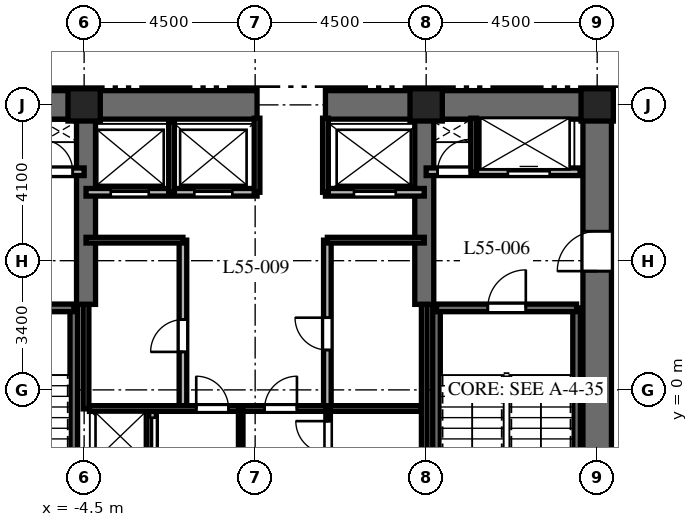
"""IFC4 building model, lengths in metres.
Left out: names, types, materials, properties, quantities, classifications, styles, units other than length and angle.
Written with IfcOpenShell. Run it as: python <this file> out.ifc"""

import sys

from ifc_helpers import new_model, si_unit, direction, frame, frame_2d, origin, origin_2d, place, context, subcontext, project, spatial, rectangle, extrude, element, fill, save


model = new_model("IFC4")
c1 = context("Model", 3, precision=1e-05, world=origin(), true_north=direction((0.0, 1.0)))
c2 = subcontext(c1, "Body", "Model", "MODEL_VIEW")
j1 = project(units=[si_unit("LENGTHUNIT", "METRE"), si_unit("PLANEANGLEUNIT", "RADIAN")], contexts=[c1])
p1 = place(None, origin())
s1 = spatial("IfcSite", under=j1, at=p1, CompositionType="ELEMENT")
p2 = place(p1, origin())
s2 = spatial("IfcBuilding", under=s1, at=p2, CompositionType="ELEMENT")
p3 = place(p2, frame((0.0, 0.0, 221.7)))
s3 = spatial("IfcBuildingStorey", under=s2, at=p3, CompositionType="ELEMENT", Elevation=221.7)
p4 = place(p3, frame((-9.375, 7.5, 0.0), z_axis=(0.0, 0.0, 1.0), x_axis=(1.0, 0.0, 0.0)))
e1 = element("IfcWall", 1, at=p4, inside=s3, PredefinedType="SHEAR", context=c2, shape_type="SweptSolid", body=[
    extrude(rectangle(XDim=9.425, YDim=0.75, at=frame_2d((4.712, 0.0))), origin(), (0.0, 0.0, 1.0), 3.8),
])
p5 = place(p3, frame((1.85, 7.5, 0.0), z_axis=(0.0, 0.0, 1.0), x_axis=(1.0, 0.0, 0.0)))
e2 = element("IfcWall", 2, at=p5, inside=s3, PredefinedType="SHEAR", context=c2, shape_type="SweptSolid", body=[
    extrude(rectangle(XDim=7.525, YDim=0.75, at=frame_2d((3.762, 0.0))), origin(), (0.0, 0.0, 1.0), 3.8),
])
p6 = place(p3, frame((9.0, -7.125, 0.0), z_axis=(0.0, 0.0, 1.0), x_axis=(0.0, 1.0, 0.0)))
e3 = element("IfcWall", 3, at=p6, inside=s3, PredefinedType="SHEAR", context=c2, shape_type="SweptSolid", body=[
    extrude(rectangle(XDim=14.25, YDim=0.75, at=frame_2d((7.125, 0.0))), origin(), (0.0, 0.0, 1.0), 3.8),
])
p7 = place(p6, frame((10.25, 0.0, 0.0)))
e4 = element("IfcOpeningElement", 4, at=p7, cuts=e3, PredefinedType="OPENING", context=c2, shape_type="SweptSolid", body=[
    extrude(rectangle(XDim=1.05, YDim=2.15, at=frame_2d((0.525, 1.075))), frame((0.0, 0.385, 0.0), z_axis=(0.0, -1.0, 0.0), x_axis=(1.0, 0.0, 0.0)), (0.0, 0.0, 1.0), 0.77),
])
for number, where, z_axis, x_axis in (
    (5, (-4.45, 2.25, 0.0), (0.0, 0.0, 1.0), (0.0, 1.0, 0.0)),
    (6, (4.45, 2.25, 0.0), (0.0, 0.0, 1.0), (0.0, 1.0, 0.0)),
):
    element("IfcWall", number, at=place(p3, frame(where, z_axis=z_axis, x_axis=x_axis)), inside=s3, PredefinedType="SHEAR", context=c2, shape_type="SweptSolid", body=[
        extrude(rectangle(XDim=4.875, YDim=0.5, at=frame_2d((2.438, 0.0))), origin(), (0.0, 0.0, 1.0), 3.8),
    ])
p8 = place(p3, frame((-4.772, -6.985, 0.0), z_axis=(0.0, 0.0, 1.0), x_axis=(0.0, 1.0, 0.0)))
e7 = element("IfcWall", 7, at=p8, inside=s3, PredefinedType="SHEAR", context=c2, shape_type="SweptSolid", body=[
    extrude(rectangle(XDim=9.143, YDim=0.2, at=frame_2d((4.572, 0.0))), origin(), (0.0, 0.0, 1.0), 3.8),
])
p9 = place(p3, frame((-8.458, 2.158, 0.0), z_axis=(0.0, 0.0, 1.0), x_axis=(1.0, 0.0, 0.0)))
e8 = element("IfcWall", 8, at=p9, inside=s3, PredefinedType="SHEAR", context=c2, shape_type="SweptSolid", body=[
    extrude(rectangle(XDim=3.686, YDim=0.2, at=frame_2d((1.843, 0.0))), origin(), (0.0, 0.0, 1.0), 3.8),
])
p10 = place(p9, frame((1.3, 0.0, 0.0)))
e9 = element("IfcOpeningElement", 9, at=p10, cuts=e8, PredefinedType="OPENING", context=c2, shape_type="SweptSolid", body=[
    extrude(rectangle(XDim=1.0, YDim=2.15, at=frame_2d((0.5, 1.075))), frame((0.0, 0.11, 0.0), z_axis=(0.0, -1.0, 0.0), x_axis=(1.0, 0.0, 0.0)), (0.0, 0.0, 1.0), 0.22),
])
for number, where, z_axis, x_axis in (
    (10, (4.772, -6.985, 0.0), (0.0, 0.0, 1.0), (0.0, 1.0, 0.0)),
    (11, (8.458, -6.985, 0.0), (0.0, 0.0, 1.0), (0.0, 1.0, 0.0)),
):
    element("IfcWall", number, at=place(p3, frame(where, z_axis=z_axis, x_axis=x_axis)), inside=s3, PredefinedType="SHEAR", context=c2, shape_type="SweptSolid", body=[
        extrude(rectangle(XDim=9.143, YDim=0.2, at=frame_2d((4.572, 0.0))), origin(), (0.0, 0.0, 1.0), 3.8),
    ])
p11 = place(p3, frame((4.772, 2.158, 0.0), z_axis=(0.0, 0.0, 1.0), x_axis=(1.0, 0.0, 0.0)))
e12 = element("IfcWall", 12, at=p11, inside=s3, PredefinedType="SHEAR", context=c2, shape_type="SweptSolid", body=[
    extrude(rectangle(XDim=3.686, YDim=0.2, at=frame_2d((1.843, 0.0))), origin(), (0.0, 0.0, 1.0), 3.8),
])
p12 = place(p11, frame((1.35, 0.0, 0.0)))
e13 = element("IfcOpeningElement", 13, at=p12, cuts=e12, PredefinedType="OPENING", context=c2, shape_type="SweptSolid", body=[
    extrude(rectangle(XDim=1.0, YDim=2.15, at=frame_2d((0.5, 1.075))), frame((0.0, 0.11, 0.0), z_axis=(0.0, -1.0, 0.0), x_axis=(1.0, 0.0, 0.0)), (0.0, 0.0, 1.0), 0.22),
])
for number, where, z_axis, x_axis in (
    (14, (9.0, 7.5, 0.0), (0.0, 0.0, 1.0), (1.0, 0.0, 0.0)),
    (15, (4.5, 7.5, 0.0), (0.0, 0.0, 1.0), (1.0, 0.0, 0.0)),
    (16, (-4.5, 7.5, 0.0), (0.0, 0.0, 1.0), (1.0, 0.0, 0.0)),
):
    element("IfcColumn", number, at=place(p3, frame(where, z_axis=z_axis, x_axis=x_axis)), inside=s3, PredefinedType="COLUMN", context=c2, shape_type="SweptSolid", body=[
        extrude(rectangle(XDim=0.85, YDim=0.85, at=origin_2d()), origin(), (0.0, 0.0, 1.0), 3.8),
    ])
p13 = place(p3, frame((-8.55, 5.74, 0.0), z_axis=(0.0, 0.0, 1.0), x_axis=(1.0, 0.0, 0.0)))
e17 = element("IfcWall", 17, at=p13, inside=s3, PredefinedType="PARTITIONING", context=c2, shape_type="SweptSolid", body=[
    extrude(rectangle(XDim=4.05, YDim=0.2, at=frame_2d((2.025, 0.0))), origin(), (0.0, 0.0, 1.0), 3.5),
])
p14 = place(p13, frame((0.75, 0.0, 0.0)))
e18 = element("IfcOpeningElement", 18, at=p14, cuts=e17, PredefinedType="OPENING", context=c2, shape_type="SweptSolid", body=[
    extrude(rectangle(XDim=1.1, YDim=2.2, at=frame_2d((0.55, 1.1))), frame((0.0, 0.11, 0.0), z_axis=(0.0, -1.0, 0.0), x_axis=(1.0, 0.0, 0.0)), (0.0, 0.0, 1.0), 0.22),
])
p15 = place(p13, frame((2.9, 0.0, 0.0)))
e19 = element("IfcOpeningElement", 19, at=p15, cuts=e17, PredefinedType="OPENING", context=c2, shape_type="SweptSolid", body=[
    extrude(rectangle(XDim=0.85, YDim=2.03, at=frame_2d((0.425, 1.015))), frame((0.0, 0.11, 0.0), z_axis=(0.0, -1.0, 0.0), x_axis=(1.0, 0.0, 0.0)), (0.0, 0.0, 1.0), 0.22),
])
p16 = place(p3, frame((4.5, 5.74, 0.0), z_axis=(0.0, 0.0, 1.0), x_axis=(1.0, 0.0, 0.0)))
e20 = element("IfcWall", 20, at=p16, inside=s3, PredefinedType="PARTITIONING", context=c2, shape_type="SweptSolid", body=[
    extrude(rectangle(XDim=4.05, YDim=0.2, at=frame_2d((2.025, 0.0))), origin(), (0.0, 0.0, 1.0), 3.5),
])
p17 = place(p16, frame((0.3, 0.0, 0.0)))
e21 = element("IfcOpeningElement", 21, at=p17, cuts=e20, PredefinedType="OPENING", context=c2, shape_type="SweptSolid", body=[
    extrude(rectangle(XDim=0.85, YDim=2.03, at=frame_2d((0.425, 1.015))), frame((0.0, 0.11, 0.0), z_axis=(0.0, -1.0, 0.0), x_axis=(1.0, 0.0, 0.0)), (0.0, 0.0, 1.0), 0.22),
])
p18 = place(p16, frame((2.15, 0.0, 0.0)))
e22 = element("IfcOpeningElement", 22, at=p18, cuts=e20, PredefinedType="OPENING", context=c2, shape_type="SweptSolid", body=[
    extrude(rectangle(XDim=1.1, YDim=2.2, at=frame_2d((0.55, 1.1))), frame((0.0, 0.11, 0.0), z_axis=(0.0, -1.0, 0.0), x_axis=(1.0, 0.0, 0.0)), (0.0, 0.0, 1.0), 0.22),
])
p19 = place(p3, frame((5.75, 5.74, 0.0), z_axis=(0.0, 0.0, 1.0), x_axis=(0.0, 1.0, 0.0)))
e23 = element("IfcWall", 23, at=p19, inside=s3, PredefinedType="PARTITIONING", context=c2, shape_type="SweptSolid", body=[
    extrude(rectangle(XDim=1.41, YDim=0.15, at=frame_2d((0.705, 0.0))), origin(), (0.0, 0.0, 1.0), 3.5),
])
p20 = place(p3, frame((-2.7, -1.972, 0.0), z_axis=(0.0, 0.0, 1.0), x_axis=(0.0, 1.0, 0.0)))
e24 = element("IfcWall", 24, at=p20, inside=s3, PredefinedType="PARTITIONING", context=c2, shape_type="SweptSolid", body=[
    extrude(rectangle(XDim=1.472, YDim=0.2, at=frame_2d((0.736, 0.0))), origin(), (0.0, 0.0, 1.0), 3.5),
])
p21 = place(p20, frame((0.24, 0.0, 0.0)))
e25 = element("IfcOpeningElement", 25, at=p21, cuts=e24, PredefinedType="OPENING", context=c2, shape_type="SweptSolid", body=[
    extrude(rectangle(XDim=1.0, YDim=2.2, at=frame_2d((0.5, 1.1))), frame((0.0, 0.11, 0.0), z_axis=(0.0, -1.0, 0.0), x_axis=(1.0, 0.0, 0.0)), (0.0, 0.0, 1.0), 0.22),
])
p22 = place(p3, frame((-4.45, 5.2, 0.0), z_axis=(0.0, 0.0, 1.0), x_axis=(1.0, 0.0, 0.0)))
e26 = element("IfcWall", 26, at=p22, inside=s3, PredefinedType="PARTITIONING", context=c2, shape_type="SweptSolid", body=[
    extrude(rectangle(XDim=4.5, YDim=0.2, at=frame_2d((2.25, 0.0))), origin(), (0.0, 0.0, 1.0), 3.5),
])
p23 = place(p22, frame((0.65, 0.0, 0.0)))
e27 = element("IfcOpeningElement", 27, at=p23, cuts=e26, PredefinedType="OPENING", context=c2, shape_type="SweptSolid", body=[
    extrude(rectangle(XDim=1.0, YDim=2.2, at=frame_2d((0.5, 1.1))), frame((0.0, 0.11, 0.0), z_axis=(0.0, -1.0, 0.0), x_axis=(1.0, 0.0, 0.0)), (0.0, 0.0, 1.0), 0.22),
])
p24 = place(p22, frame((2.85, 0.0, 0.0)))
e28 = element("IfcOpeningElement", 28, at=p24, cuts=e26, PredefinedType="OPENING", context=c2, shape_type="SweptSolid", body=[
    extrude(rectangle(XDim=1.0, YDim=2.2, at=frame_2d((0.5, 1.1))), frame((0.0, 0.11, 0.0), z_axis=(0.0, -1.0, 0.0), x_axis=(1.0, 0.0, 0.0)), (0.0, 0.0, 1.0), 0.22),
])
p25 = place(p3, frame((1.85, 5.2, 0.0), z_axis=(0.0, 0.0, 1.0), x_axis=(1.0, 0.0, 0.0)))
e29 = element("IfcWall", 29, at=p25, inside=s3, PredefinedType="PARTITIONING", context=c2, shape_type="SweptSolid", body=[
    extrude(rectangle(XDim=2.6, YDim=0.2, at=frame_2d((1.3, 0.0))), origin(), (0.0, 0.0, 1.0), 3.5),
])
p26 = place(p25, frame((0.75, 0.0, 0.0)))
e30 = element("IfcOpeningElement", 30, at=p26, cuts=e29, PredefinedType="OPENING", context=c2, shape_type="SweptSolid", body=[
    extrude(rectangle(XDim=1.1, YDim=2.2, at=frame_2d((0.55, 1.1))), frame((0.0, 0.11, 0.0), z_axis=(0.0, -1.0, 0.0), x_axis=(1.0, 0.0, 0.0)), (0.0, 0.0, 1.0), 0.22),
])
p27 = place(p3, frame((-2.2, 5.2, 0.0), z_axis=(0.0, 0.0, 1.0), x_axis=(0.0, 1.0, 0.0)))
e31 = element("IfcWall", 31, at=p27, inside=s3, PredefinedType="PARTITIONING", context=c2, shape_type="SweptSolid", body=[
    extrude(rectangle(XDim=1.85, YDim=0.15, at=frame_2d((0.925, 0.0))), origin(), (0.0, 0.0, 1.0), 3.5),
])
for number, where, z_axis, x_axis in (
    (32, (0.05, 5.2, 0.0), (0.0, 0.0, 1.0), (0.0, 1.0, 0.0)),
    (33, (1.85, 5.2, 0.0), (0.0, 0.0, 1.0), (0.0, 1.0, 0.0)),
):
    element("IfcWall", number, at=place(p3, frame(where, z_axis=z_axis, x_axis=x_axis)), inside=s3, PredefinedType="PARTITIONING", context=c2, shape_type="SweptSolid", body=[
        extrude(rectangle(XDim=1.95, YDim=0.15, at=frame_2d((0.975, 0.0))), origin(), (0.0, 0.0, 1.0), 3.5),
    ])
p28 = place(p3, frame((-4.45, -0.5, 0.0), z_axis=(0.0, 0.0, 1.0), x_axis=(0.0, 1.0, 0.0)))
e34 = element("IfcWall", 34, at=p28, inside=s3, PredefinedType="PARTITIONING", context=c2, shape_type="SweptSolid", body=[
    extrude(rectangle(XDim=2.75, YDim=0.15, at=frame_2d((1.375, 0.0))), origin(), (0.0, 0.0, 1.0), 3.5),
])
p29 = place(p3, frame((4.45, -1.972, 0.0), z_axis=(0.0, 0.0, 1.0), x_axis=(0.0, 1.0, 0.0)))
e35 = element("IfcWall", 35, at=p29, inside=s3, PredefinedType="PARTITIONING", context=c2, shape_type="SweptSolid", body=[
    extrude(rectangle(XDim=4.222, YDim=0.15, at=frame_2d((2.111, 0.0))), origin(), (0.0, 0.0, 1.0), 3.5),
])
p30 = place(p3, frame((-1.9, -0.5, 0.0), z_axis=(0.0, 0.0, 1.0), x_axis=(0.0, 1.0, 0.0)))
e36 = element("IfcWall", 36, at=p30, inside=s3, PredefinedType="PARTITIONING", context=c2, shape_type="SweptSolid", body=[
    extrude(rectangle(XDim=4.44, YDim=0.2, at=frame_2d((2.22, 0.0))), origin(), (0.0, 0.0, 1.0), 3.5),
])
p31 = place(p30, frame((1.5, 0.0, 0.0)))
e37 = element("IfcOpeningElement", 37, at=p31, cuts=e36, PredefinedType="OPENING", context=c2, shape_type="SweptSolid", body=[
    extrude(rectangle(XDim=0.85, YDim=2.03, at=frame_2d((0.425, 1.015))), frame((0.0, 0.11, 0.0), z_axis=(0.0, -1.0, 0.0), x_axis=(1.0, 0.0, 0.0)), (0.0, 0.0, 1.0), 0.22),
])
p32 = place(p3, frame((-4.45, 3.94, 0.0), z_axis=(0.0, 0.0, 1.0), x_axis=(1.0, 0.0, 0.0)))
e38 = element("IfcWall", 38, at=p32, inside=s3, PredefinedType="PARTITIONING", context=c2, shape_type="SweptSolid", body=[
    extrude(rectangle(XDim=2.55, YDim=0.15, at=frame_2d((1.275, 0.0))), origin(), (0.0, 0.0, 1.0), 3.5),
])
p33 = place(p3, frame((1.9, -0.5, 0.0), z_axis=(0.0, 0.0, 1.0), x_axis=(0.0, 1.0, 0.0)))
e39 = element("IfcWall", 39, at=p33, inside=s3, PredefinedType="PARTITIONING", context=c2, shape_type="SweptSolid", body=[
    extrude(rectangle(XDim=4.44, YDim=0.2, at=frame_2d((2.22, 0.0))), origin(), (0.0, 0.0, 1.0), 3.5),
])
p34 = place(p33, frame((1.55, 0.0, 0.0)))
e40 = element("IfcOpeningElement", 40, at=p34, cuts=e39, PredefinedType="OPENING", context=c2, shape_type="SweptSolid", body=[
    extrude(rectangle(XDim=0.85, YDim=2.03, at=frame_2d((0.425, 1.015))), frame((0.0, 0.11, 0.0), z_axis=(0.0, -1.0, 0.0), x_axis=(1.0, 0.0, 0.0)), (0.0, 0.0, 1.0), 0.22),
])
p35 = place(p3, frame((1.9, 3.94, 0.0), z_axis=(0.0, 0.0, 1.0), x_axis=(1.0, 0.0, 0.0)))
e41 = element("IfcWall", 41, at=p35, inside=s3, PredefinedType="PARTITIONING", context=c2, shape_type="SweptSolid", body=[
    extrude(rectangle(XDim=2.55, YDim=0.15, at=frame_2d((1.275, 0.0))), origin(), (0.0, 0.0, 1.0), 3.5),
])
p36 = place(p3, frame((-4.36, -0.49, 0.0), z_axis=(0.0, 0.0, 1.0), x_axis=(1.0, 0.0, 0.0)))
e42 = element("IfcWall", 42, at=p36, inside=s3, PredefinedType="PARTITIONING", context=c2, shape_type="SweptSolid", body=[
    extrude(rectangle(XDim=8.72, YDim=0.15, at=frame_2d((4.36, 0.0))), origin(), (0.0, 0.0, 1.0), 3.5),
])
p37 = place(p36, frame((2.81, 0.0, 0.0)))
e43 = element("IfcOpeningElement", 43, at=p37, cuts=e42, PredefinedType="OPENING", context=c2, shape_type="SweptSolid", body=[
    extrude(rectangle(XDim=0.85, YDim=2.03, at=frame_2d((0.425, 1.015))), frame((0.0, 0.085, 0.0), z_axis=(0.0, -1.0, 0.0), x_axis=(1.0, 0.0, 0.0)), (0.0, 0.0, 1.0), 0.17),
])
p38 = place(p36, frame((4.61, 0.0, 0.0)))
e44 = element("IfcOpeningElement", 44, at=p38, cuts=e42, PredefinedType="OPENING", context=c2, shape_type="SweptSolid", body=[
    extrude(rectangle(XDim=0.85, YDim=2.03, at=frame_2d((0.425, 1.015))), frame((0.0, 0.085, 0.0), z_axis=(0.0, -1.0, 0.0), x_axis=(1.0, 0.0, 0.0)), (0.0, 0.0, 1.0), 0.17),
])
p39 = place(p3, frame((-0.38, -1.972, 0.0), z_axis=(0.0, 0.0, 1.0), x_axis=(0.0, 1.0, 0.0)))
e45 = element("IfcWall", 45, at=p39, inside=s3, PredefinedType="PARTITIONING", context=c2, shape_type="SweptSolid", body=[
    extrude(rectangle(XDim=1.472, YDim=0.12, at=frame_2d((0.736, 0.0))), origin(), (0.0, 0.0, 1.0), 3.5),
])
p40 = place(p3, frame((1.92, -1.972, 0.0), z_axis=(0.0, 0.0, 1.0), x_axis=(0.0, 1.0, 0.0)))
e46 = element("IfcWall", 46, at=p40, inside=s3, PredefinedType="PARTITIONING", context=c2, shape_type="SweptSolid", body=[
    extrude(rectangle(XDim=1.472, YDim=0.12, at=frame_2d((0.736, 0.0))), origin(), (0.0, 0.0, 1.0), 3.5),
])
p41 = place(p40, frame((0.3, 0.0, 0.0)))
e47 = element("IfcOpeningElement", 47, at=p41, cuts=e46, PredefinedType="OPENING", context=c2, shape_type="SweptSolid", body=[
    extrude(rectangle(XDim=0.85, YDim=2.03, at=frame_2d((0.425, 1.015))), frame((0.0, 0.07, 0.0), z_axis=(0.0, -1.0, 0.0), x_axis=(1.0, 0.0, 0.0)), (0.0, 0.0, 1.0), 0.14),
])
p42 = place(p12, origin())
e48 = element("IfcDoor", 48, at=p42, inside=s3, OperationType="SINGLE_SWING_RIGHT", PredefinedType="DOOR", context=c2, shape_type="SweptSolid", body=[
    extrude(rectangle(XDim=1.0, YDim=2.15, at=frame_2d((0.5, 1.075))), frame((0.0, 0.025, 0.0), z_axis=(0.0, -1.0, 0.0), x_axis=(1.0, 0.0, 0.0)), (0.0, 0.0, 1.0), 0.05),
])
fill(e13, e48)
p43 = place(p7, origin())
e49 = element("IfcDoor", 49, at=p43, inside=s3, OperationType="SINGLE_SWING_LEFT", PredefinedType="DOOR", context=c2, shape_type="SweptSolid", body=[
    extrude(rectangle(XDim=1.05, YDim=2.15, at=frame_2d((0.525, 1.075))), frame((0.0, 0.025, 0.0), z_axis=(0.0, -1.0, 0.0), x_axis=(1.0, 0.0, 0.0)), (0.0, 0.0, 1.0), 0.05),
])
fill(e4, e49)
p44 = place(p15, origin())
e50 = element("IfcDoor", 50, at=p44, inside=s3, OperationType="SINGLE_SWING_LEFT", PredefinedType="DOOR", context=c2, shape_type="SweptSolid", body=[
    extrude(rectangle(XDim=0.85, YDim=2.03, at=frame_2d((0.425, 1.015))), frame((0.0, 0.025, 0.0), z_axis=(0.0, -1.0, 0.0), x_axis=(1.0, 0.0, 0.0)), (0.0, 0.0, 1.0), 0.05),
])
fill(e19, e50)
p45 = place(p17, origin())
e51 = element("IfcDoor", 51, at=p45, inside=s3, OperationType="SINGLE_SWING_RIGHT", PredefinedType="DOOR", context=c2, shape_type="SweptSolid", body=[
    extrude(rectangle(XDim=0.85, YDim=2.03, at=frame_2d((0.425, 1.015))), frame((0.0, 0.025, 0.0), z_axis=(0.0, -1.0, 0.0), x_axis=(1.0, 0.0, 0.0)), (0.0, 0.0, 1.0), 0.05),
])
fill(e21, e51)
p46 = place(p18, origin())
e52 = element("IfcDoor", 52, at=p46, inside=s3, OperationType="SLIDING_TO_RIGHT", PredefinedType="DOOR", context=c2, shape_type="SweptSolid", body=[
    extrude(rectangle(XDim=1.1, YDim=2.2, at=frame_2d((0.55, 1.1))), frame((0.0, 0.025, 0.0), z_axis=(0.0, -1.0, 0.0), x_axis=(1.0, 0.0, 0.0)), (0.0, 0.0, 1.0), 0.05),
])
fill(e22, e52)
p47 = place(p21, origin())
e53 = element("IfcDoor", 53, at=p47, inside=s3, OperationType="SLIDING_TO_LEFT", PredefinedType="DOOR", context=c2, shape_type="SweptSolid", body=[
    extrude(rectangle(XDim=1.0, YDim=2.2, at=frame_2d((0.5, 1.1))), frame((0.0, 0.025, 0.0), z_axis=(0.0, -1.0, 0.0), x_axis=(1.0, 0.0, 0.0)), (0.0, 0.0, 1.0), 0.05),
])
fill(e25, e53)
p48 = place(p23, origin())
e54 = element("IfcDoor", 54, at=p48, inside=s3, OperationType="SLIDING_TO_LEFT", PredefinedType="DOOR", context=c2, shape_type="SweptSolid", body=[
    extrude(rectangle(XDim=1.0, YDim=2.2, at=frame_2d((0.5, 1.1))), frame((0.0, 0.025, 0.0), z_axis=(0.0, -1.0, 0.0), x_axis=(1.0, 0.0, 0.0)), (0.0, 0.0, 1.0), 0.05),
])
fill(e27, e54)
p49 = place(p24, origin())
e55 = element("IfcDoor", 55, at=p49, inside=s3, OperationType="SLIDING_TO_RIGHT", PredefinedType="DOOR", context=c2, shape_type="SweptSolid", body=[
    extrude(rectangle(XDim=1.0, YDim=2.2, at=frame_2d((0.5, 1.1))), frame((0.0, 0.025, 0.0), z_axis=(0.0, -1.0, 0.0), x_axis=(1.0, 0.0, 0.0)), (0.0, 0.0, 1.0), 0.05),
])
fill(e28, e55)
p50 = place(p26, origin())
e56 = element("IfcDoor", 56, at=p50, inside=s3, OperationType="SLIDING_TO_RIGHT", PredefinedType="DOOR", context=c2, shape_type="SweptSolid", body=[
    extrude(rectangle(XDim=1.1, YDim=2.2, at=frame_2d((0.55, 1.1))), frame((0.0, 0.025, 0.0), z_axis=(0.0, -1.0, 0.0), x_axis=(1.0, 0.0, 0.0)), (0.0, 0.0, 1.0), 0.05),
])
fill(e30, e56)
p51 = place(p31, origin())
e57 = element("IfcDoor", 57, at=p51, inside=s3, OperationType="SINGLE_SWING_LEFT", PredefinedType="DOOR", context=c2, shape_type="SweptSolid", body=[
    extrude(rectangle(XDim=0.85, YDim=2.03, at=frame_2d((0.425, 1.015))), frame((0.0, 0.025, 0.0), z_axis=(0.0, -1.0, 0.0), x_axis=(1.0, 0.0, 0.0)), (0.0, 0.0, 1.0), 0.05),
])
fill(e37, e57)
p52 = place(p34, origin())
e58 = element("IfcDoor", 58, at=p52, inside=s3, OperationType="SINGLE_SWING_RIGHT", PredefinedType="DOOR", context=c2, shape_type="SweptSolid", body=[
    extrude(rectangle(XDim=0.85, YDim=2.03, at=frame_2d((0.425, 1.015))), frame((0.0, 0.025, 0.0), z_axis=(0.0, -1.0, 0.0), x_axis=(1.0, 0.0, 0.0)), (0.0, 0.0, 1.0), 0.05),
])
fill(e40, e58)
p53 = place(p37, origin())
e59 = element("IfcDoor", 59, at=p53, inside=s3, OperationType="SINGLE_SWING_LEFT", PredefinedType="DOOR", context=c2, shape_type="SweptSolid", body=[
    extrude(rectangle(XDim=0.85, YDim=2.03, at=frame_2d((0.425, 1.015))), frame((0.0, 0.025, 0.0), z_axis=(0.0, -1.0, 0.0), x_axis=(1.0, 0.0, 0.0)), (0.0, 0.0, 1.0), 0.05),
])
fill(e43, e59)
p54 = place(p38, origin())
e60 = element("IfcDoor", 60, at=p54, inside=s3, OperationType="SINGLE_SWING_RIGHT", PredefinedType="DOOR", context=c2, shape_type="SweptSolid", body=[
    extrude(rectangle(XDim=0.85, YDim=2.03, at=frame_2d((0.425, 1.015))), frame((0.0, 0.025, 0.0), z_axis=(0.0, -1.0, 0.0), x_axis=(1.0, 0.0, 0.0)), (0.0, 0.0, 1.0), 0.05),
])
fill(e44, e60)
p55 = place(p41, origin())
e61 = element("IfcDoor", 61, at=p55, inside=s3, OperationType="SINGLE_SWING_RIGHT", PredefinedType="DOOR", context=c2, shape_type="SweptSolid", body=[
    extrude(rectangle(XDim=0.85, YDim=2.03, at=frame_2d((0.425, 1.015))), frame((0.0, 0.025, 0.0), z_axis=(0.0, -1.0, 0.0), x_axis=(1.0, 0.0, 0.0)), (0.0, 0.0, 1.0), 0.05),
])
fill(e47, e61)
save(model, sys.argv[1])
